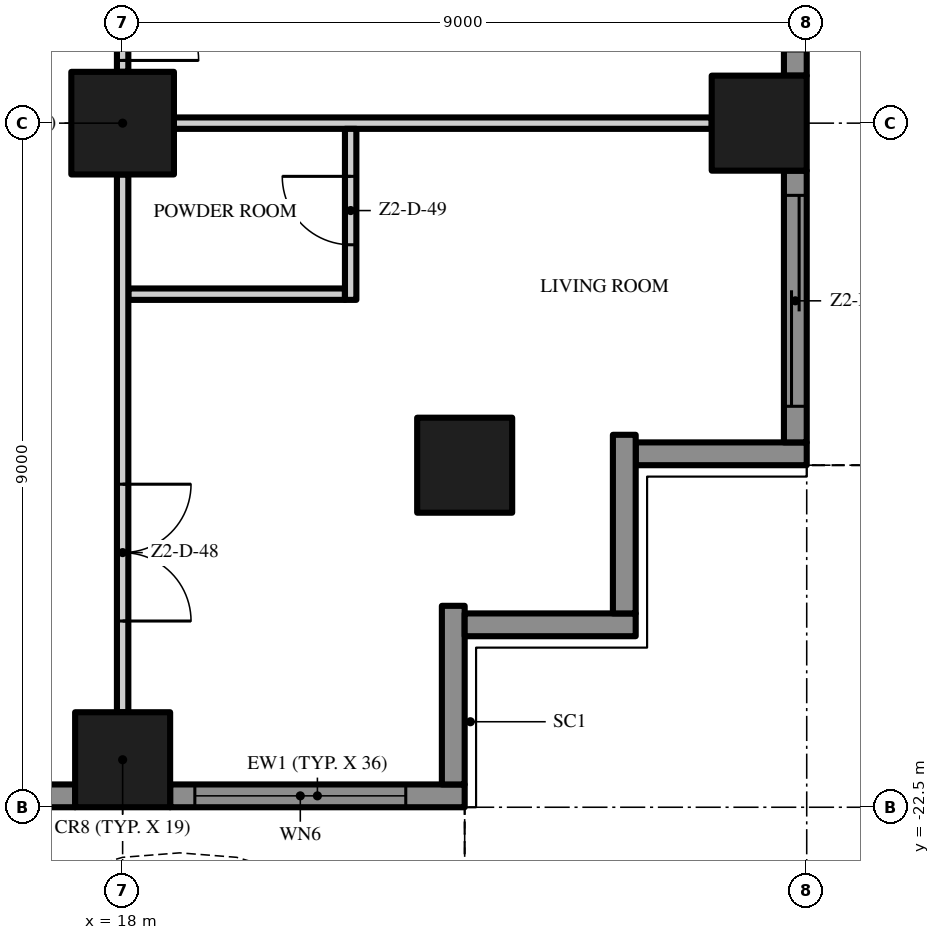
"""IFC4 building model, lengths in metres.
Left out: names, types, materials, properties, quantities, classifications, styles, units other than length and angle.
Written with IfcOpenShell. Run it as: python <this file> out.ifc"""

import sys

from ifc_helpers import new_model, si_unit, direction, frame, frame_2d, origin, origin_2d, place, context, subcontext, project, spatial, polyline, rectangle, outline, extrude, element, fill, save


model = new_model("IFC4")
c1 = context("Model", 3, precision=1e-05, world=origin(), true_north=direction((0.0, 1.0)))
c2 = subcontext(c1, "Body", "Model", "MODEL_VIEW")
j1 = project(units=[si_unit("LENGTHUNIT", "METRE"), si_unit("PLANEANGLEUNIT", "RADIAN")], contexts=[c1])
p1 = place(None, origin())
s1 = spatial("IfcSite", under=j1, at=p1, CompositionType="ELEMENT")
p2 = place(p1, origin())
s2 = spatial("IfcBuilding", under=s1, at=p2, CompositionType="ELEMENT")
p3 = place(p2, frame((0.0, 0.0, 107.4)))
s3 = spatial("IfcBuildingStorey", under=s2, at=p3, CompositionType="ELEMENT", Elevation=107.4)
p4 = place(p3, frame((18.0, -13.5, 0.0), z_axis=(0.0, 0.0, 1.0), x_axis=(1.0, 0.0, 0.0)))
e1 = element("IfcColumn", 1, at=p4, inside=s3, PredefinedType="COLUMN", context=c2, shape_type="SweptSolid", body=[
    extrude(rectangle(XDim=1.35, YDim=1.35, at=origin_2d()), origin(), (0.0, 0.0, 1.0), 3.5),
])
for number, where, z_axis, x_axis in (
    (2, (18.0, -21.875, 0.0), (0.0, 0.0, 1.0), (1.0, 0.0, 0.0)),
    (3, (26.375, -13.5, 0.0), (0.0, 0.0, 1.0), (1.0, 0.0, 0.0)),
    (4, (22.5, -18.0, 0.0), (0.0, 0.0, 1.0), (1.0, 0.0, 0.0)),
):
    element("IfcColumn", number, at=place(p3, frame(where, z_axis=z_axis, x_axis=x_axis)), inside=s3, PredefinedType="COLUMN", context=c2, shape_type="SweptSolid", body=[
        extrude(rectangle(XDim=1.25, YDim=1.25, at=origin_2d()), origin(), (0.0, 0.0, 1.0), 3.5),
    ])
p5 = place(p3, frame((17.375, -22.35, 0.0), z_axis=(0.0, 0.0, 1.0), x_axis=(-1.0, 0.0, 0.0)))
e5 = element("IfcWall", 5, at=p5, inside=s3, PredefinedType="SOLIDWALL", context=c2, shape_type="SweptSolid", body=[
    extrude(rectangle(XDim=7.75, YDim=0.3, at=frame_2d((3.875, 0.0))), origin(), (0.0, 0.0, 1.0), 3.5),
])
p6 = place(p5, frame((4.65, 0.0, 0.0)))
e6 = element("IfcOpeningElement", 6, at=p6, cuts=e5, PredefinedType="OPENING", context=c2, shape_type="SweptSolid", body=[
    extrude(rectangle(XDim=2.775, YDim=2.4, at=frame_2d((1.387, 1.2))), frame((0.0, 0.16, 0.0), z_axis=(0.0, -1.0, 0.0), x_axis=(1.0, 0.0, 0.0)), (0.0, 0.0, 1.0), 0.32),
])
p7 = place(p5, frame((0.325, 0.0, 0.45)))
e7 = element("IfcOpeningElement", 7, at=p7, cuts=e5, PredefinedType="OPENING", context=c2, shape_type="SweptSolid", body=[
    extrude(rectangle(XDim=2.775, YDim=2.65, at=frame_2d((1.387, 1.325))), frame((0.0, 0.16, 0.0), z_axis=(0.0, -1.0, 0.0), x_axis=(1.0, 0.0, 0.0)), (0.0, 0.0, 1.0), 0.32),
])
p8 = place(p3, frame((22.5, -22.35, 0.0), z_axis=(0.0, 0.0, 1.0), x_axis=(-1.0, 0.0, 0.0)))
e8 = element("IfcWall", 8, at=p8, inside=s3, PredefinedType="SOLIDWALL", context=c2, shape_type="SweptSolid", body=[
    extrude(rectangle(XDim=3.875, YDim=0.3, at=frame_2d((1.938, 0.0))), origin(), (0.0, 0.0, 1.0), 3.5),
])
p9 = place(p8, frame((0.775, 0.0, 0.45)))
e9 = element("IfcOpeningElement", 9, at=p9, cuts=e8, PredefinedType="OPENING", context=c2, shape_type="SweptSolid", body=[
    extrude(rectangle(XDim=2.775, YDim=2.65, at=frame_2d((1.387, 1.325))), frame((0.0, 0.16, 0.0), z_axis=(0.0, -1.0, 0.0), x_axis=(1.0, 0.0, 0.0)), (0.0, 0.0, 1.0), 0.32),
])
p10 = place(p3, frame((22.35, -19.85, 0.0), z_axis=(0.0, 0.0, 1.0), x_axis=(0.0, -1.0, 0.0)))
e10 = element("IfcWall", 10, at=p10, inside=s3, PredefinedType="SOLIDWALL", context=c2, shape_type="SweptSolid", body=[
    extrude(rectangle(XDim=2.35, YDim=0.3, at=frame_2d((1.175, 0.0))), origin(), (0.0, 0.0, 1.0), 3.5),
])
p11 = place(p3, frame((24.75, -20.1, 0.0), z_axis=(0.0, 0.0, 1.0), x_axis=(-1.0, 0.0, 0.0)))
e11 = element("IfcWall", 11, at=p11, inside=s3, PredefinedType="SOLIDWALL", context=c2, shape_type="SweptSolid", body=[
    extrude(rectangle(XDim=2.25, YDim=0.3, at=frame_2d((1.125, 0.0))), origin(), (0.0, 0.0, 1.0), 3.5),
])
p12 = place(p3, frame((24.6, -17.6, 0.0), z_axis=(0.0, 0.0, 1.0), x_axis=(0.0, -1.0, 0.0)))
e12 = element("IfcWall", 12, at=p12, inside=s3, PredefinedType="SOLIDWALL", context=c2, shape_type="SweptSolid", body=[
    extrude(rectangle(XDim=2.35, YDim=0.3, at=frame_2d((1.175, 0.0))), origin(), (0.0, 0.0, 1.0), 3.5),
])
p13 = place(p3, frame((27.0, -17.85, 0.0), z_axis=(0.0, 0.0, 1.0), x_axis=(-1.0, 0.0, 0.0)))
e13 = element("IfcWall", 13, at=p13, inside=s3, PredefinedType="SOLIDWALL", context=c2, shape_type="SweptSolid", body=[
    extrude(rectangle(XDim=2.25, YDim=0.3, at=frame_2d((1.125, 0.0))), origin(), (0.0, 0.0, 1.0), 3.5),
])
p14 = place(p3, frame((26.85, -14.125, 0.0), z_axis=(0.0, 0.0, 1.0), x_axis=(0.0, -1.0, 0.0)))
e14 = element("IfcWall", 14, at=p14, inside=s3, PredefinedType="SOLIDWALL", context=c2, shape_type="SweptSolid", body=[
    extrude(rectangle(XDim=3.575, YDim=0.3, at=frame_2d((1.788, 0.0))), origin(), (0.0, 0.0, 1.0), 3.5),
])
p15 = place(p14, frame((0.325, 0.0, 0.0)))
e15 = element("IfcOpeningElement", 15, at=p15, cuts=e14, PredefinedType="OPENING", context=c2, shape_type="SweptSolid", body=[
    extrude(rectangle(XDim=2.775, YDim=2.4, at=frame_2d((1.387, 1.2))), frame((0.0, 0.16, 0.0), z_axis=(0.0, -1.0, 0.0), x_axis=(1.0, 0.0, 0.0)), (0.0, 0.0, 1.0), 0.32),
])
p16 = place(p3, frame((26.85, -5.125, 0.0), z_axis=(0.0, 0.0, 1.0), x_axis=(0.0, -1.0, 0.0)))
e16 = element("IfcWall", 16, at=p16, inside=s3, PredefinedType="SOLIDWALL", context=c2, shape_type="SweptSolid", body=[
    extrude(rectangle(XDim=7.75, YDim=0.3, at=frame_2d((3.875, 0.0))), origin(), (0.0, 0.0, 1.0), 3.5),
])
p17 = place(p16, frame((4.65, 0.0, 0.45)))
e17 = element("IfcOpeningElement", 17, at=p17, cuts=e16, PredefinedType="OPENING", context=c2, shape_type="SweptSolid", body=[
    extrude(rectangle(XDim=2.775, YDim=2.65, at=frame_2d((1.387, 1.325))), frame((0.0, 0.16, 0.0), z_axis=(0.0, -1.0, 0.0), x_axis=(1.0, 0.0, 0.0)), (0.0, 0.0, 1.0), 0.32),
])
p18 = place(p16, frame((0.325, 0.0, 0.45)))
e18 = element("IfcOpeningElement", 18, at=p18, cuts=e16, PredefinedType="OPENING", context=c2, shape_type="SweptSolid", body=[
    extrude(rectangle(XDim=2.775, YDim=2.65, at=frame_2d((1.387, 1.325))), frame((0.0, 0.16, 0.0), z_axis=(0.0, -1.0, 0.0), x_axis=(1.0, 0.0, 0.0)), (0.0, 0.0, 1.0), 0.32),
])
p19 = place(p3, origin())
e19 = element("IfcWall", 19, at=p19, inside=s3, PredefinedType="USERDEFINED", context=c2, shape_type="SweptSolid", body=[
    extrude(outline(polyline([(-22.5, -24.3), (-21.0, -25.005), (-19.5, -25.441), (-18.75, -25.5), (-18.0, -25.441), (-16.5, -25.005), (-15.0, -24.3), (-13.5, -23.595), (-12.0, -23.159), (-11.25, -23.1), (-10.5, -23.159), (-9.0, -23.595), (-7.5, -24.3), (-6.0, -25.005), (-4.5, -25.441), (-3.75, -25.5), (-3.0, -25.441), (-1.5, -25.005), (0.0, -24.3), (1.5, -23.595), (3.0, -23.159), (3.75, -23.1), (4.5, -23.159), (6.0, -23.595), (7.5, -24.3), (9.0, -25.005), (10.5, -25.441), (11.25, -25.5), (12.0, -25.441), (13.5, -25.005), (15.0, -24.3), (16.5, -23.595), (18.0, -23.159), (18.75, -23.1), (19.5, -23.159), (21.0, -23.595), (22.5, -24.3), (22.606, -24.074), (21.089, -23.36), (19.545, -22.911), (18.75, -22.849), (17.955, -22.911), (16.411, -23.36), (14.894, -24.074), (13.411, -24.771), (11.955, -25.194), (11.25, -25.249), (10.545, -25.194), (9.089, -24.771), (7.606, -24.074), (6.089, -23.36), (4.545, -22.911), (3.75, -22.849), (2.955, -22.911), (1.411, -23.36), (-0.106, -24.074), (-1.589, -24.771), (-3.045, -25.194), (-3.75, -25.249), (-4.455, -25.194), (-5.911, -24.771), (-7.394, -24.074), (-8.911, -23.36), (-10.455, -22.911), (-11.25, -22.849), (-12.045, -22.911), (-13.589, -23.36), (-15.106, -24.074), (-16.589, -24.771), (-18.045, -25.194), (-18.75, -25.249), (-19.455, -25.194), (-20.911, -24.771), (-22.394, -24.074), (-22.5, -24.3)])), origin(), (0.0, 0.0, 1.0), 0.9),
])
p20 = place(p3, origin())
e20 = element("IfcWall", 20, at=p20, inside=s3, PredefinedType="USERDEFINED", context=c2, shape_type="SweptSolid", body=[
    extrude(outline(polyline([(28.8, -18.0), (29.505, -16.5), (29.941, -15.0), (30.0, -14.25), (29.941, -13.5), (29.505, -12.0), (28.8, -10.5), (28.095, -9.0), (27.659, -7.5), (27.6, -6.75), (27.659, -6.0), (28.095, -4.5), (28.8, -3.0), (29.505, -1.5), (29.941, 0.0), (30.0, 0.75), (29.941, 1.5), (29.505, 3.0), (28.8, 4.5), (28.095, 6.0), (27.659, 7.5), (27.6, 8.25), (27.659, 9.0), (28.095, 10.5), (28.8, 12.0), (29.505, 13.5), (29.941, 15.0), (30.0, 15.75), (29.941, 16.5), (29.505, 18.0), (29.265, 17.93), (29.694, 16.455), (29.749, 15.75), (29.694, 15.045), (29.271, 13.589), (28.574, 12.106), (27.86, 10.589), (27.411, 9.045), (27.349, 8.25), (27.411, 7.455), (27.86, 5.911), (28.574, 4.394), (29.271, 2.911), (29.694, 1.455), (29.749, 0.75), (29.694, 0.045), (29.271, -1.411), (28.574, -2.894), (27.86, -4.411), (27.411, -5.955), (27.349, -6.75), (27.411, -7.545), (27.86, -9.089), (28.574, -10.606), (29.271, -12.089), (29.694, -13.545), (29.749, -14.25), (29.694, -14.955), (29.271, -16.411), (28.574, -17.894), (28.8, -18.0)])), origin(), (0.0, 0.0, 1.0), 0.9),
])
p21 = place(p3, frame((18.075, -15.75, 0.0), z_axis=(0.0, 0.0, 1.0), x_axis=(1.0, 0.0, 0.0)))
e21 = element("IfcWall", 21, at=p21, inside=s3, PredefinedType="PARTITIONING", context=c2, shape_type="SweptSolid", body=[
    extrude(rectangle(XDim=2.85, YDim=0.15, at=frame_2d((1.425, 0.0))), origin(), (0.0, 0.0, 1.0), 3.5),
])
p22 = place(p3, frame((18.675, -13.5, 0.0), z_axis=(0.0, 0.0, 1.0), x_axis=(1.0, 0.0, 0.0)))
e22 = element("IfcWall", 22, at=p22, inside=s3, PredefinedType="PARTITIONING", context=c2, shape_type="SweptSolid", body=[
    extrude(rectangle(XDim=7.075, YDim=0.15, at=frame_2d((3.538, 0.0))), origin(), (0.0, 0.0, 1.0), 3.5),
])
p23 = place(p3, frame((18.0, -14.175, 0.0), z_axis=(0.0, 0.0, 1.0), x_axis=(0.0, -1.0, 0.0)))
e23 = element("IfcWall", 23, at=p23, inside=s3, PredefinedType="PARTITIONING", context=c2, shape_type="SweptSolid", body=[
    extrude(rectangle(XDim=7.075, YDim=0.15, at=frame_2d((3.538, 0.0))), origin(), (0.0, 0.0, 1.0), 3.5),
])
p24 = place(p23, frame((4.075, 0.0, 0.0)))
e24 = element("IfcOpeningElement", 24, at=p24, cuts=e23, PredefinedType="OPENING", context=c2, shape_type="SweptSolid", body=[
    extrude(rectangle(XDim=1.8, YDim=2.4, at=frame_2d((0.9, 1.2))), frame((0.0, 0.085, 0.0), z_axis=(0.0, -1.0, 0.0), x_axis=(1.0, 0.0, 0.0)), (0.0, 0.0, 1.0), 0.17),
])
p25 = place(p3, frame((18.0, -5.175, 0.0), z_axis=(0.0, 0.0, 1.0), x_axis=(0.0, -1.0, 0.0)))
e25 = element("IfcWall", 25, at=p25, inside=s3, PredefinedType="PARTITIONING", context=c2, shape_type="SweptSolid", body=[
    extrude(rectangle(XDim=7.65, YDim=0.15, at=frame_2d((3.825, 0.0))), origin(), (0.0, 0.0, 1.0), 3.5),
])
p26 = place(p25, frame((0.15, 0.0, 0.0)))
e26 = element("IfcOpeningElement", 26, at=p26, cuts=e25, PredefinedType="OPENING", context=c2, shape_type="SweptSolid", body=[
    extrude(rectangle(XDim=1.0, YDim=2.4, at=frame_2d((0.5, 1.2))), frame((0.0, 0.085, 0.0), z_axis=(0.0, -1.0, 0.0), x_axis=(1.0, 0.0, 0.0)), (0.0, 0.0, 1.0), 0.17),
])
p27 = place(p25, frame((6.5, 0.0, 0.0)))
e27 = element("IfcOpeningElement", 27, at=p27, cuts=e25, PredefinedType="OPENING", context=c2, shape_type="SweptSolid", body=[
    extrude(rectangle(XDim=1.0, YDim=2.4, at=frame_2d((0.5, 1.2))), frame((0.0, 0.085, 0.0), z_axis=(0.0, -1.0, 0.0), x_axis=(1.0, 0.0, 0.0)), (0.0, 0.0, 1.0), 0.17),
])
p28 = place(p3, frame((21.0, -15.825, 0.0), z_axis=(0.0, 0.0, 1.0), x_axis=(0.0, 1.0, 0.0)))
e28 = element("IfcWall", 28, at=p28, inside=s3, PredefinedType="PARTITIONING", context=c2, shape_type="SweptSolid", body=[
    extrude(rectangle(XDim=2.25, YDim=0.15, at=frame_2d((1.125, 0.0))), origin(), (0.0, 0.0, 1.0), 3.5),
])
p29 = place(p28, frame((0.725, 0.0, 0.0)))
e29 = element("IfcOpeningElement", 29, at=p29, cuts=e28, PredefinedType="OPENING", context=c2, shape_type="SweptSolid", body=[
    extrude(rectangle(XDim=0.9, YDim=2.1, at=frame_2d((0.45, 1.05))), frame((0.0, 0.085, 0.0), z_axis=(0.0, -1.0, 0.0), x_axis=(1.0, 0.0, 0.0)), (0.0, 0.0, 1.0), 0.17),
])
p30 = place(p9, origin())
e30 = element("IfcWindow", 30, at=p30, inside=s3, PartitioningType="SINGLE_PANEL", PredefinedType="WINDOW", context=c2, shape_type="SweptSolid", body=[
    extrude(rectangle(XDim=2.775, YDim=2.65, at=frame_2d((1.387, 1.325))), frame((0.0, 0.03, 0.0), z_axis=(0.0, -1.0, 0.0), x_axis=(1.0, 0.0, 0.0)), (0.0, 0.0, 1.0), 0.06),
])
fill(e9, e30)
p31 = place(p15, origin())
e31 = element("IfcDoor", 31, at=p31, inside=s3, OperationType="SINGLE_SWING_LEFT", PredefinedType="DOOR", context=c2, shape_type="SweptSolid", body=[
    extrude(rectangle(XDim=2.775, YDim=2.4, at=frame_2d((1.387, 1.2))), frame((0.0, 0.025, 0.0), z_axis=(0.0, -1.0, 0.0), x_axis=(1.0, 0.0, 0.0)), (0.0, 0.0, 1.0), 0.05),
])
fill(e15, e31)
p32 = place(p27, origin())
e32 = element("IfcDoor", 32, at=p32, inside=s3, OperationType="SINGLE_SWING_RIGHT", PredefinedType="DOOR", context=c2, shape_type="SweptSolid", body=[
    extrude(rectangle(XDim=1.0, YDim=2.4, at=frame_2d((0.5, 1.2))), frame((0.0, 0.025, 0.0), z_axis=(0.0, -1.0, 0.0), x_axis=(1.0, 0.0, 0.0)), (0.0, 0.0, 1.0), 0.05),
])
fill(e27, e32)
p33 = place(p24, origin())
e33 = element("IfcDoor", 33, at=p33, inside=s3, OperationType="DOUBLE_DOOR_SINGLE_SWING", PredefinedType="DOOR", context=c2, shape_type="SweptSolid", body=[
    extrude(rectangle(XDim=1.8, YDim=2.4, at=frame_2d((0.9, 1.2))), frame((0.0, 0.025, 0.0), z_axis=(0.0, -1.0, 0.0), x_axis=(1.0, 0.0, 0.0)), (0.0, 0.0, 1.0), 0.05),
])
fill(e24, e33)
p34 = place(p29, origin())
e34 = element("IfcDoor", 34, at=p34, inside=s3, OperationType="SINGLE_SWING_RIGHT", PredefinedType="DOOR", context=c2, shape_type="SweptSolid", body=[
    extrude(rectangle(XDim=0.9, YDim=2.1, at=frame_2d((0.45, 1.05))), frame((0.0, 0.025, 0.0), z_axis=(0.0, -1.0, 0.0), x_axis=(1.0, 0.0, 0.0)), (0.0, 0.0, 1.0), 0.05),
])
fill(e29, e34)
save(model, sys.argv[1])
